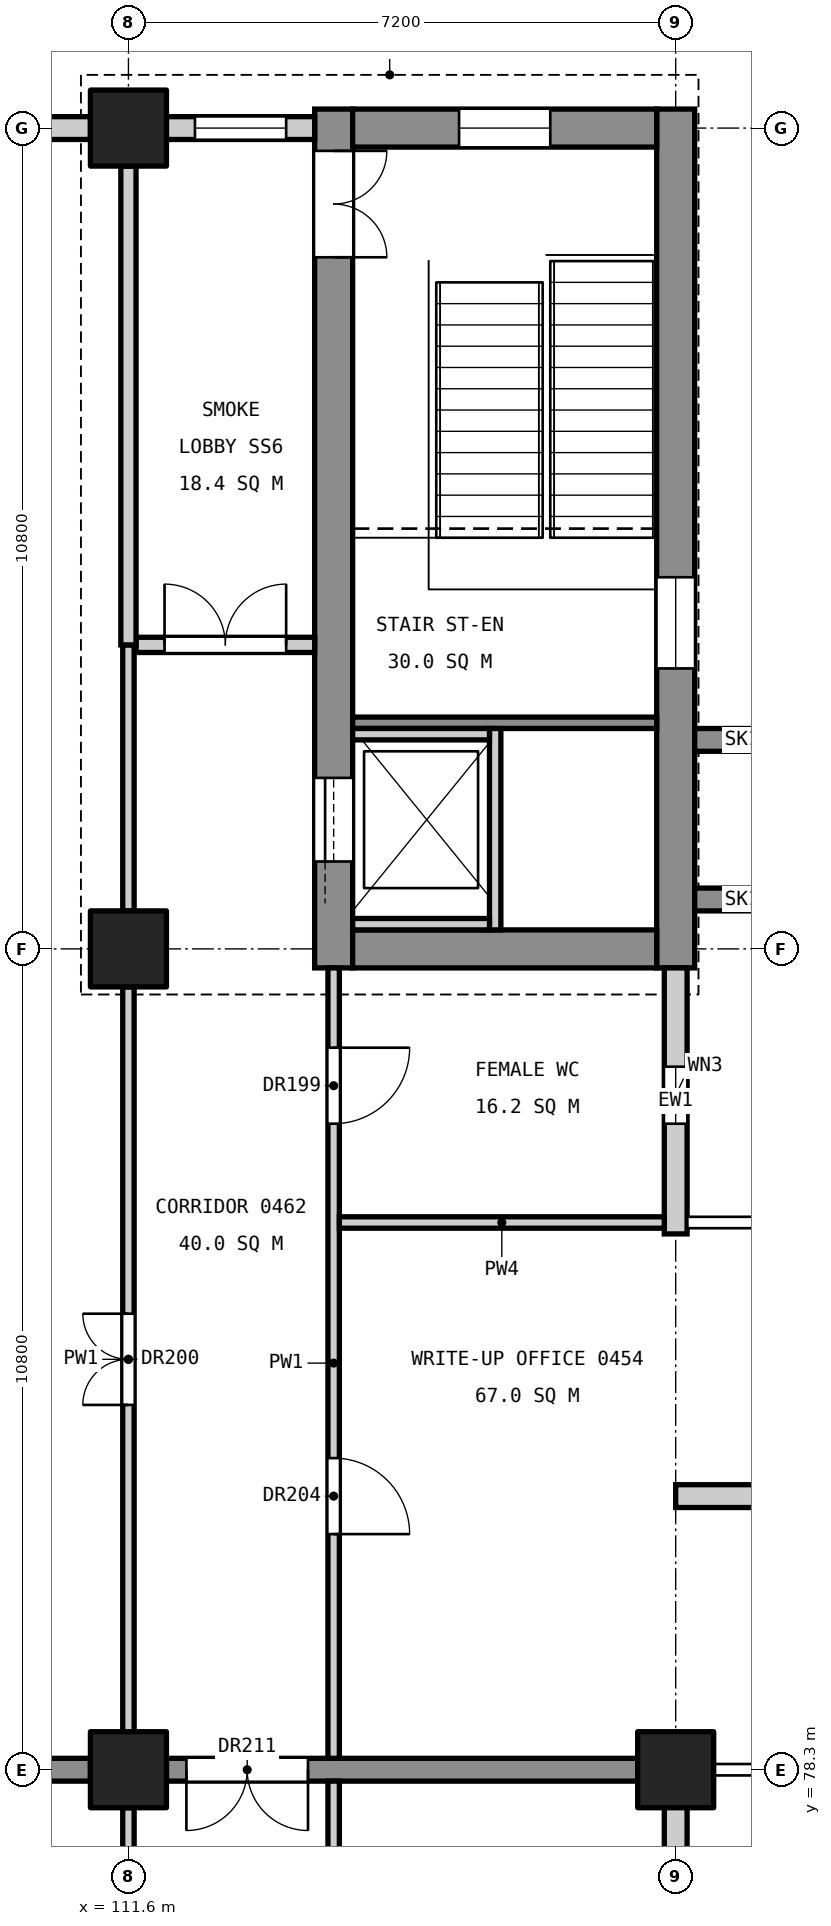
"""IFC4 building model, lengths in metres.
Left out: names, types, materials, properties, quantities, classifications, styles, units other than length and angle.
Written with IfcOpenShell. Run it as: python <this file> out.ifc"""

import sys

from ifc_helpers import new_model, si_unit, direction, frame, frame_2d, origin, origin_2d, place, context, subcontext, project, spatial, rectangle, extrude, element, fill, save


model = new_model("IFC4")
c1 = context("Model", 3, precision=1e-05, world=origin(), true_north=direction((0.0, 1.0)))
c2 = subcontext(c1, "Body", "Model", "MODEL_VIEW")
j1 = project(units=[si_unit("LENGTHUNIT", "METRE"), si_unit("PLANEANGLEUNIT", "RADIAN")], contexts=[c1])
p1 = place(None, origin())
s1 = spatial("IfcSite", under=j1, at=p1, CompositionType="ELEMENT")
p2 = place(p1, origin())
s2 = spatial("IfcBuilding", under=s1, at=p2, CompositionType="ELEMENT")
p3 = place(p2, frame((0.0, 0.0, 22.2)))
s3 = spatial("IfcBuildingStorey", under=s2, at=p3, CompositionType="ELEMENT", Elevation=22.2)
for number, where, z_axis, x_axis in (
    (1, (118.8, 78.3, 0.0), (0.0, 0.0, 1.0), (1.0, 0.0, 0.0)),
    (2, (111.6, 78.3, 0.0), (0.0, 0.0, 1.0), (1.0, 0.0, 0.0)),
    (3, (111.6, 89.1, 0.0), (0.0, 0.0, 1.0), (1.0, 0.0, 0.0)),
    (4, (111.6, 99.9, 0.0), (0.0, 0.0, 1.0), (1.0, 0.0, 0.0)),
):
    element("IfcColumn", number, at=place(p3, frame(where, z_axis=z_axis, x_axis=x_axis)), inside=s3, PredefinedType="COLUMN", context=c2, shape_type="SweptSolid", body=[
        extrude(rectangle(XDim=1.0, YDim=1.0, at=origin_2d()), origin(), (0.0, 0.0, 1.0), 4.8),
    ])
p4 = place(p3, frame((118.8, 88.85, 0.0), z_axis=(0.0, 0.0, 1.0), x_axis=(0.0, 1.0, 0.0)))
e5 = element("IfcWall", 5, at=p4, inside=s3, PredefinedType="SHEAR", context=c2, shape_type="SweptSolid", body=[
    extrude(rectangle(XDim=11.3, YDim=0.5, at=frame_2d((5.65, 0.0))), origin(), (0.0, 0.0, 1.0), 4.55),
])
p5 = place(p4, frame((3.94, 0.0, 3.4)))
e6 = element("IfcOpeningElement", 6, at=p5, cuts=e5, PredefinedType="OPENING", context=c2, shape_type="SweptSolid", body=[
    extrude(rectangle(XDim=1.2, YDim=0.9, at=frame_2d((0.6, 0.45))), frame((0.0, 0.26, 0.0), z_axis=(0.0, -1.0, 0.0), x_axis=(1.0, 0.0, 0.0)), (0.0, 0.0, 1.0), 0.52),
])
p6 = place(p3, frame((114.3, 88.85, 0.0), z_axis=(0.0, 0.0, 1.0), x_axis=(0.0, 1.0, 0.0)))
e7 = element("IfcWall", 7, at=p6, inside=s3, PredefinedType="SHEAR", context=c2, shape_type="SweptSolid", body=[
    extrude(rectangle(XDim=11.3, YDim=0.5, at=frame_2d((5.65, 0.0))), origin(), (0.0, 0.0, 1.0), 4.55),
])
p7 = place(p6, frame((9.35, 0.0, 0.0)))
e8 = element("IfcOpeningElement", 8, at=p7, cuts=e7, PredefinedType="OPENING", context=c2, shape_type="SweptSolid", body=[
    extrude(rectangle(XDim=1.4, YDim=2.1, at=frame_2d((0.7, 1.05))), frame((0.0, 0.26, 0.0), z_axis=(0.0, -1.0, 0.0), x_axis=(1.0, 0.0, 0.0)), (0.0, 0.0, 1.0), 0.52),
])
p8 = place(p6, frame((1.4, 0.0, 0.0)))
e9 = element("IfcOpeningElement", 9, at=p8, cuts=e7, PredefinedType="OPENING", context=c2, shape_type="SweptSolid", body=[
    extrude(rectangle(XDim=1.1, YDim=2.1, at=frame_2d((0.55, 1.05))), frame((0.0, 0.26, 0.0), z_axis=(0.0, -1.0, 0.0), x_axis=(1.0, 0.0, 0.0)), (0.0, 0.0, 1.0), 0.52),
])
p9 = place(p3, frame((118.55, 89.1, 0.0), z_axis=(0.0, 0.0, 1.0), x_axis=(-1.0, 0.0, 0.0)))
e10 = element("IfcWall", 10, at=p9, inside=s3, PredefinedType="SHEAR", context=c2, shape_type="SweptSolid", body=[
    extrude(rectangle(XDim=4.0, YDim=0.5, at=frame_2d((2.0, 0.0))), origin(), (0.0, 0.0, 1.0), 4.55),
])
p10 = place(p3, frame((118.55, 99.9, 0.0), z_axis=(0.0, 0.0, 1.0), x_axis=(-1.0, 0.0, 0.0)))
e11 = element("IfcWall", 11, at=p10, inside=s3, PredefinedType="SHEAR", context=c2, shape_type="SweptSolid", body=[
    extrude(rectangle(XDim=4.0, YDim=0.5, at=frame_2d((2.0, 0.0))), origin(), (0.0, 0.0, 1.0), 4.55),
])
p11 = place(p10, frame((1.4, 0.0, 3.4)))
e12 = element("IfcOpeningElement", 12, at=p11, cuts=e11, PredefinedType="OPENING", context=c2, shape_type="SweptSolid", body=[
    extrude(rectangle(XDim=1.2, YDim=0.9, at=frame_2d((0.6, 0.45))), frame((0.0, 0.26, 0.0), z_axis=(0.0, -1.0, 0.0), x_axis=(1.0, 0.0, 0.0)), (0.0, 0.0, 1.0), 0.52),
])
for number, where, z_axis, x_axis in (
    (13, (119.05, 89.75, 0.0), (0.0, 0.0, 1.0), (1.0, 0.0, 0.0)),
    (14, (119.05, 91.85, 0.0), (0.0, 0.0, 1.0), (1.0, 0.0, 0.0)),
):
    element("IfcWall", number, at=place(p3, frame(where, z_axis=z_axis, x_axis=x_axis)), inside=s3, PredefinedType="SHEAR", context=c2, shape_type="SweptSolid", body=[
        extrude(rectangle(XDim=1.25, YDim=0.3, at=frame_2d((0.625, 0.0))), origin(), (0.0, 0.0, 1.0), 4.8),
    ])
p12 = place(p3, frame((118.3, 78.3, 0.0), z_axis=(0.0, 0.0, 1.0), x_axis=(-1.0, 0.0, 0.0)))
e15 = element("IfcWall", 15, at=p12, inside=s3, PredefinedType="SHEAR", context=c2, shape_type="SweptSolid", body=[
    extrude(rectangle(XDim=6.2, YDim=0.3, at=frame_2d((3.1, 0.0))), origin(), (0.0, 0.0, 1.0), 4.55),
])
p13 = place(p12, frame((4.337, 0.0, 0.0)))
e16 = element("IfcOpeningElement", 16, at=p13, cuts=e15, PredefinedType="OPENING", context=c2, shape_type="SweptSolid", body=[
    extrude(rectangle(XDim=1.6, YDim=2.1, at=frame_2d((0.8, 1.05))), frame((0.0, 0.16, 0.0), z_axis=(0.0, -1.0, 0.0), x_axis=(1.0, 0.0, 0.0)), (0.0, 0.0, 1.0), 0.32),
])
p14 = place(p3, frame((111.1, 78.3, 0.0), z_axis=(0.0, 0.0, 1.0), x_axis=(-1.0, 0.0, 0.0)))
e17 = element("IfcWall", 17, at=p14, inside=s3, PredefinedType="SHEAR", context=c2, shape_type="SweptSolid", body=[
    extrude(rectangle(XDim=9.8, YDim=0.3, at=frame_2d((4.9, 0.0))), origin(), (0.0, 0.0, 1.0), 4.55),
])
p15 = place(p3, frame((118.55, 92.075, 0.0), z_axis=(0.0, 0.0, 1.0), x_axis=(-1.0, 0.0, 0.0)))
e18 = element("IfcWall", 18, at=p15, inside=s3, PredefinedType="SOLIDWALL", context=c2, shape_type="SweptSolid", body=[
    extrude(rectangle(XDim=4.0, YDim=0.15, at=frame_2d((2.0, 0.0))), origin(), (0.0, 0.0, 1.0), 4.55),
])
p16 = place(p3, frame((116.425, 92.0, 0.0), z_axis=(0.0, 0.0, 1.0), x_axis=(0.0, -1.0, 0.0)))
e19 = element("IfcWall", 19, at=p16, inside=s3, PredefinedType="SOLIDWALL", context=c2, shape_type="SweptSolid", body=[
    extrude(rectangle(XDim=2.65, YDim=0.15, at=frame_2d((1.325, 0.0))), origin(), (0.0, 0.0, 1.0), 4.8),
])
for number, where, z_axis, x_axis in (
    (20, (116.35, 91.925, 0.0), (0.0, 0.0, 1.0), (-1.0, 0.0, 0.0)),
    (21, (116.35, 89.425, 0.0), (0.0, 0.0, 1.0), (-1.0, 0.0, 0.0)),
):
    element("IfcWall", number, at=place(p3, frame(where, z_axis=z_axis, x_axis=x_axis)), inside=s3, PredefinedType="SOLIDWALL", context=c2, shape_type="SweptSolid", body=[
        extrude(rectangle(XDim=1.8, YDim=0.15, at=frame_2d((0.9, 0.0))), origin(), (0.0, 0.0, 1.0), 4.8),
    ])
p17 = place(p3, frame((118.8, 74.95, 0.0), z_axis=(0.0, 0.0, 1.0), x_axis=(0.0, 1.0, 0.0)))
e22 = element("IfcWall", 22, at=p17, inside=s3, PredefinedType="STANDARD", context=c2, shape_type="SweptSolid", body=[
    extrude(rectangle(XDim=3.5, YDim=0.3, at=frame_2d((1.75, 0.0))), origin(), (0.0, 0.0, 1.0), 3.65),
])
p18 = place(p17, frame((1.3, 0.0, 0.8)))
e23 = element("IfcOpeningElement", 23, at=p18, cuts=e22, PredefinedType="OPENING", context=c2, shape_type="SweptSolid", body=[
    extrude(rectangle(XDim=0.75, YDim=1.2, at=frame_2d((0.375, 0.6))), frame((0.0, 0.16, 0.0), z_axis=(0.0, -1.0, 0.0), x_axis=(1.0, 0.0, 0.0)), (0.0, 0.0, 1.0), 0.32),
])
p19 = place(p3, frame((118.8, 85.35, 0.0), z_axis=(0.0, 0.0, 1.0), x_axis=(0.0, 1.0, 0.0)))
e24 = element("IfcWall", 24, at=p19, inside=s3, PredefinedType="STANDARD", context=c2, shape_type="SweptSolid", body=[
    extrude(rectangle(XDim=3.5, YDim=0.3, at=frame_2d((1.75, 0.0))), origin(), (0.0, 0.0, 1.0), 3.65),
])
p20 = place(p19, frame((1.45, 0.0, 0.8)))
e25 = element("IfcOpeningElement", 25, at=p20, cuts=e24, PredefinedType="OPENING", context=c2, shape_type="SweptSolid", body=[
    extrude(rectangle(XDim=0.75, YDim=1.2, at=frame_2d((0.375, 0.6))), frame((0.0, 0.16, 0.0), z_axis=(0.0, -1.0, 0.0), x_axis=(1.0, 0.0, 0.0)), (0.0, 0.0, 1.0), 0.32),
])
p21 = place(p3, frame((114.05, 99.9, 0.0), z_axis=(0.0, 0.0, 1.0), x_axis=(-1.0, 0.0, 0.0)))
e26 = element("IfcWall", 26, at=p21, inside=s3, PredefinedType="STANDARD", context=c2, shape_type="SweptSolid", body=[
    extrude(rectangle(XDim=1.95, YDim=0.3, at=frame_2d((0.975, 0.0))), origin(), (0.0, 0.0, 1.0), 3.85),
])
p22 = place(p21, frame((0.375, 0.0, 0.9)))
e27 = element("IfcOpeningElement", 27, at=p22, cuts=e26, PredefinedType="OPENING", context=c2, shape_type="SweptSolid", body=[
    extrude(rectangle(XDim=1.2, YDim=2.4, at=frame_2d((0.6, 1.2))), frame((0.0, 0.16, 0.0), z_axis=(0.0, -1.0, 0.0), x_axis=(1.0, 0.0, 0.0)), (0.0, 0.0, 1.0), 0.32),
])
p23 = place(p3, frame((111.1, 99.9, 0.0), z_axis=(0.0, 0.0, 1.0), x_axis=(-1.0, 0.0, 0.0)))
e28 = element("IfcWall", 28, at=p23, inside=s3, PredefinedType="STANDARD", context=c2, shape_type="SweptSolid", body=[
    extrude(rectangle(XDim=9.8, YDim=0.3, at=frame_2d((4.9, 0.0))), origin(), (0.0, 0.0, 1.0), 3.85),
])
p24 = place(p23, frame((0.65, 0.0, 0.9)))
e29 = element("IfcOpeningElement", 29, at=p24, cuts=e28, PredefinedType="OPENING", context=c2, shape_type="SweptSolid", body=[
    extrude(rectangle(XDim=1.8, YDim=2.4, at=frame_2d((0.9, 1.2))), frame((0.0, 0.16, 0.0), z_axis=(0.0, -1.0, 0.0), x_axis=(1.0, 0.0, 0.0)), (0.0, 0.0, 1.0), 0.32),
])
p25 = place(p23, frame((4.525, 0.0, 0.8)))
e30 = element("IfcOpeningElement", 30, at=p25, cuts=e28, PredefinedType="OPENING", context=c2, shape_type="SweptSolid", body=[
    extrude(rectangle(XDim=0.75, YDim=1.2, at=frame_2d((0.375, 0.6))), frame((0.0, 0.16, 0.0), z_axis=(0.0, -1.0, 0.0), x_axis=(1.0, 0.0, 0.0)), (0.0, 0.0, 1.0), 0.32),
])
p26 = place(p23, frame((7.35, 0.0, 0.9)))
e31 = element("IfcOpeningElement", 31, at=p26, cuts=e28, PredefinedType="OPENING", context=c2, shape_type="SweptSolid", body=[
    extrude(rectangle(XDim=1.8, YDim=2.4, at=frame_2d((0.9, 1.2))), frame((0.0, 0.16, 0.0), z_axis=(0.0, -1.0, 0.0), x_axis=(1.0, 0.0, 0.0)), (0.0, 0.0, 1.0), 0.32),
])
p27 = place(p3, frame((123.6, 81.9, 0.0), z_axis=(0.0, 0.0, 1.0), x_axis=(-1.0, 0.0, 0.0)))
e32 = element("IfcWall", 32, at=p27, inside=s3, PredefinedType="STANDARD", context=c2, shape_type="SweptSolid", body=[
    extrude(rectangle(XDim=4.8, YDim=0.3, at=frame_2d((2.4, 0.0))), origin(), (0.0, 0.0, 1.0), 3.65),
])
p28 = place(p3, frame((114.3, 74.95, 0.0), z_axis=(0.0, 0.0, 1.0), x_axis=(0.0, 1.0, 0.0)))
e33 = element("IfcWall", 33, at=p28, inside=s3, PredefinedType="PARTITIONING", context=c2, shape_type="SweptSolid", body=[
    extrude(rectangle(XDim=3.2, YDim=0.15, at=frame_2d((1.6, 0.0))), origin(), (0.0, 0.0, 1.0), 3.55),
])
p29 = place(p28, frame((1.05, 0.0, 0.0)))
e34 = element("IfcOpeningElement", 34, at=p29, cuts=e33, PredefinedType="OPENING", context=c2, shape_type="SweptSolid", body=[
    extrude(rectangle(XDim=1.0, YDim=2.1, at=frame_2d((0.5, 1.05))), frame((0.0, 0.085, 0.0), z_axis=(0.0, -1.0, 0.0), x_axis=(1.0, 0.0, 0.0)), (0.0, 0.0, 1.0), 0.17),
])
p30 = place(p3, frame((114.3, 78.45, 0.0), z_axis=(0.0, 0.0, 1.0), x_axis=(0.0, 1.0, 0.0)))
e35 = element("IfcWall", 35, at=p30, inside=s3, PredefinedType="PARTITIONING", context=c2, shape_type="SweptSolid", body=[
    extrude(rectangle(XDim=10.4, YDim=0.15, at=frame_2d((5.2, 0.0))), origin(), (0.0, 0.0, 1.0), 3.55),
])
p31 = place(p30, frame((8.35, 0.0, 0.0)))
e36 = element("IfcOpeningElement", 36, at=p31, cuts=e35, PredefinedType="OPENING", context=c2, shape_type="SweptSolid", body=[
    extrude(rectangle(XDim=1.0, YDim=2.1, at=frame_2d((0.5, 1.05))), frame((0.0, 0.085, 0.0), z_axis=(0.0, -1.0, 0.0), x_axis=(1.0, 0.0, 0.0)), (0.0, 0.0, 1.0), 0.17),
])
p32 = place(p30, frame((2.95, 0.0, 0.0)))
e37 = element("IfcOpeningElement", 37, at=p32, cuts=e35, PredefinedType="OPENING", context=c2, shape_type="SweptSolid", body=[
    extrude(rectangle(XDim=1.0, YDim=2.1, at=frame_2d((0.5, 1.05))), frame((0.0, 0.085, 0.0), z_axis=(0.0, -1.0, 0.0), x_axis=(1.0, 0.0, 0.0)), (0.0, 0.0, 1.0), 0.17),
])
p33 = place(p3, frame((118.65, 85.5, 0.0), z_axis=(0.0, 0.0, 1.0), x_axis=(-1.0, 0.0, 0.0)))
e38 = element("IfcWall", 38, at=p33, inside=s3, PredefinedType="PARTITIONING", context=c2, shape_type="SweptSolid", body=[
    extrude(rectangle(XDim=4.275, YDim=0.15, at=frame_2d((2.137, 0.0))), origin(), (0.0, 0.0, 1.0), 3.85),
])
p34 = place(p3, frame((114.05, 93.1, 0.0), z_axis=(0.0, 0.0, 1.0), x_axis=(-1.0, 0.0, 0.0)))
e39 = element("IfcWall", 39, at=p34, inside=s3, PredefinedType="PARTITIONING", context=c2, shape_type="SweptSolid", body=[
    extrude(rectangle(XDim=2.35, YDim=0.2, at=frame_2d((1.175, 0.0))), origin(), (0.0, 0.0, 1.0), 3.55),
])
p35 = place(p34, frame((0.375, 0.0, 0.0)))
e40 = element("IfcOpeningElement", 40, at=p35, cuts=e39, PredefinedType="OPENING", context=c2, shape_type="SweptSolid", body=[
    extrude(rectangle(XDim=1.6, YDim=2.1, at=frame_2d((0.8, 1.05))), frame((0.0, 0.11, 0.0), z_axis=(0.0, -1.0, 0.0), x_axis=(1.0, 0.0, 0.0)), (0.0, 0.0, 1.0), 0.22),
])
p36 = place(p3, frame((111.6, 70.8, 0.0), z_axis=(0.0, 0.0, 1.0), x_axis=(0.0, 1.0, 0.0)))
e41 = element("IfcWall", 41, at=p36, inside=s3, PredefinedType="PARTITIONING", context=c2, shape_type="SweptSolid", body=[
    extrude(rectangle(XDim=7.0, YDim=0.15, at=frame_2d((3.5, 0.0))), origin(), (0.0, 0.0, 1.0), 3.55),
])
p37 = place(p36, frame((2.9, 0.0, 0.0)))
e42 = element("IfcOpeningElement", 42, at=p37, cuts=e41, PredefinedType="OPENING", context=c2, shape_type="SweptSolid", body=[
    extrude(rectangle(XDim=1.2, YDim=2.1, at=frame_2d((0.6, 1.05))), frame((0.0, 0.085, 0.0), z_axis=(0.0, -1.0, 0.0), x_axis=(1.0, 0.0, 0.0)), (0.0, 0.0, 1.0), 0.17),
])
p38 = place(p3, frame((111.6, 78.8, 0.0), z_axis=(0.0, 0.0, 1.0), x_axis=(0.0, 1.0, 0.0)))
e43 = element("IfcWall", 43, at=p38, inside=s3, PredefinedType="PARTITIONING", context=c2, shape_type="SweptSolid", body=[
    extrude(rectangle(XDim=9.8, YDim=0.15, at=frame_2d((4.9, 0.0))), origin(), (0.0, 0.0, 1.0), 3.55),
])
p39 = place(p38, frame((4.3, 0.0, 0.0)))
e44 = element("IfcOpeningElement", 44, at=p39, cuts=e43, PredefinedType="OPENING", context=c2, shape_type="SweptSolid", body=[
    extrude(rectangle(XDim=1.2, YDim=2.1, at=frame_2d((0.6, 1.05))), frame((0.0, 0.085, 0.0), z_axis=(0.0, -1.0, 0.0), x_axis=(1.0, 0.0, 0.0)), (0.0, 0.0, 1.0), 0.17),
])
p40 = place(p3, frame((111.6, 89.6, 0.0), z_axis=(0.0, 0.0, 1.0), x_axis=(0.0, 1.0, 0.0)))
e45 = element("IfcWall", 45, at=p40, inside=s3, PredefinedType="PARTITIONING", context=c2, shape_type="SweptSolid", body=[
    extrude(rectangle(XDim=3.5, YDim=0.15, at=frame_2d((1.75, 0.0))), origin(), (0.0, 0.0, 1.0), 3.55),
])
p41 = place(p3, frame((111.6, 93.1, 0.0), z_axis=(0.0, 0.0, 1.0), x_axis=(0.0, 1.0, 0.0)))
e46 = element("IfcWall", 46, at=p41, inside=s3, PredefinedType="PARTITIONING", context=c2, shape_type="SweptSolid", body=[
    extrude(rectangle(XDim=6.3, YDim=0.2, at=frame_2d((3.15, 0.0))), origin(), (0.0, 0.0, 1.0), 3.55),
])
p42 = place(p7, frame((1.4, 0.0, 0.0), z_axis=(0.0, 0.0, 1.0), x_axis=(-1.0, 0.0, 0.0)))
e47 = element("IfcDoor", 47, at=p42, inside=s3, OperationType="DOUBLE_DOOR_SINGLE_SWING", PredefinedType="DOOR", context=c2, shape_type="SweptSolid", body=[
    extrude(rectangle(XDim=1.4, YDim=2.1, at=frame_2d((0.7, 1.05))), frame((0.0, 0.025, 0.0), z_axis=(0.0, -1.0, 0.0), x_axis=(1.0, 0.0, 0.0)), (0.0, 0.0, 1.0), 0.05),
])
fill(e8, e47)
p43 = place(p8, origin())
e48 = element("IfcDoor", 48, at=p43, inside=s3, OperationType="SLIDING_TO_LEFT", PredefinedType="DOOR", context=c2, shape_type="SweptSolid", body=[
    extrude(rectangle(XDim=1.1, YDim=2.1, at=frame_2d((0.55, 1.05))), frame((0.0, 0.025, 0.0), z_axis=(0.0, -1.0, 0.0), x_axis=(1.0, 0.0, 0.0)), (0.0, 0.0, 1.0), 0.05),
])
fill(e9, e48)
p44 = place(p20, origin())
e49 = element("IfcWindow", 49, at=p44, inside=s3, PartitioningType="SINGLE_PANEL", PredefinedType="WINDOW", context=c2, shape_type="SweptSolid", body=[
    extrude(rectangle(XDim=0.75, YDim=1.2, at=frame_2d((0.375, 0.6))), frame((0.0, 0.03, 0.0), z_axis=(0.0, -1.0, 0.0), x_axis=(1.0, 0.0, 0.0)), (0.0, 0.0, 1.0), 0.06),
])
fill(e25, e49)
p45 = place(p22, origin())
e50 = element("IfcWindow", 50, at=p45, inside=s3, PartitioningType="SINGLE_PANEL", PredefinedType="WINDOW", context=c2, shape_type="SweptSolid", body=[
    extrude(rectangle(XDim=1.2, YDim=2.4, at=frame_2d((0.6, 1.2))), frame((0.0, 0.03, 0.0), z_axis=(0.0, -1.0, 0.0), x_axis=(1.0, 0.0, 0.0)), (0.0, 0.0, 1.0), 0.06),
])
fill(e27, e50)
p46 = place(p5, origin())
e51 = element("IfcWindow", 51, at=p46, inside=s3, PartitioningType="SINGLE_PANEL", PredefinedType="WINDOW", context=c2, shape_type="SweptSolid", body=[
    extrude(rectangle(XDim=1.2, YDim=0.9, at=frame_2d((0.6, 0.45))), frame((0.0, 0.03, 0.0), z_axis=(0.0, -1.0, 0.0), x_axis=(1.0, 0.0, 0.0)), (0.0, 0.0, 1.0), 0.06),
])
fill(e6, e51)
p47 = place(p11, origin())
e52 = element("IfcWindow", 52, at=p47, inside=s3, PartitioningType="SINGLE_PANEL", PredefinedType="WINDOW", context=c2, shape_type="SweptSolid", body=[
    extrude(rectangle(XDim=1.2, YDim=0.9, at=frame_2d((0.6, 0.45))), frame((0.0, 0.03, 0.0), z_axis=(0.0, -1.0, 0.0), x_axis=(1.0, 0.0, 0.0)), (0.0, 0.0, 1.0), 0.06),
])
fill(e12, e52)
p48 = place(p31, frame((1.0, 0.0, 0.0), z_axis=(0.0, 0.0, 1.0), x_axis=(-1.0, 0.0, 0.0)))
e53 = element("IfcDoor", 53, at=p48, inside=s3, OperationType="SINGLE_SWING_LEFT", PredefinedType="DOOR", context=c2, shape_type="SweptSolid", body=[
    extrude(rectangle(XDim=1.0, YDim=2.1, at=frame_2d((0.5, 1.05))), frame((0.0, 0.025, 0.0), z_axis=(0.0, -1.0, 0.0), x_axis=(1.0, 0.0, 0.0)), (0.0, 0.0, 1.0), 0.05),
])
fill(e36, e53)
p49 = place(p39, origin())
e54 = element("IfcDoor", 54, at=p49, inside=s3, OperationType="DOUBLE_DOOR_SINGLE_SWING", PredefinedType="DOOR", context=c2, shape_type="SweptSolid", body=[
    extrude(rectangle(XDim=1.2, YDim=2.1, at=frame_2d((0.6, 1.05))), frame((0.0, 0.025, 0.0), z_axis=(0.0, -1.0, 0.0), x_axis=(1.0, 0.0, 0.0)), (0.0, 0.0, 1.0), 0.05),
])
fill(e44, e54)
p50 = place(p32, frame((1.0, 0.0, 0.0), z_axis=(0.0, 0.0, 1.0), x_axis=(-1.0, 0.0, 0.0)))
e55 = element("IfcDoor", 55, at=p50, inside=s3, OperationType="SINGLE_SWING_RIGHT", PredefinedType="DOOR", context=c2, shape_type="SweptSolid", body=[
    extrude(rectangle(XDim=1.0, YDim=2.1, at=frame_2d((0.5, 1.05))), frame((0.0, 0.025, 0.0), z_axis=(0.0, -1.0, 0.0), x_axis=(1.0, 0.0, 0.0)), (0.0, 0.0, 1.0), 0.05),
])
fill(e37, e55)
p51 = place(p35, frame((1.6, 0.0, 0.0), z_axis=(0.0, 0.0, 1.0), x_axis=(-1.0, 0.0, 0.0)))
e56 = element("IfcDoor", 56, at=p51, inside=s3, OperationType="DOUBLE_DOOR_SINGLE_SWING", PredefinedType="DOOR", context=c2, shape_type="SweptSolid", body=[
    extrude(rectangle(XDim=1.6, YDim=2.1, at=frame_2d((0.8, 1.05))), frame((0.0, 0.025, 0.0), z_axis=(0.0, -1.0, 0.0), x_axis=(1.0, 0.0, 0.0)), (0.0, 0.0, 1.0), 0.05),
])
fill(e40, e56)
p52 = place(p13, origin())
e57 = element("IfcDoor", 57, at=p52, inside=s3, OperationType="DOUBLE_DOOR_SINGLE_SWING", PredefinedType="DOOR", context=c2, shape_type="SweptSolid", body=[
    extrude(rectangle(XDim=1.6, YDim=2.1, at=frame_2d((0.8, 1.05))), frame((0.0, 0.025, 0.0), z_axis=(0.0, -1.0, 0.0), x_axis=(1.0, 0.0, 0.0)), (0.0, 0.0, 1.0), 0.05),
])
fill(e16, e57)
save(model, sys.argv[1])
